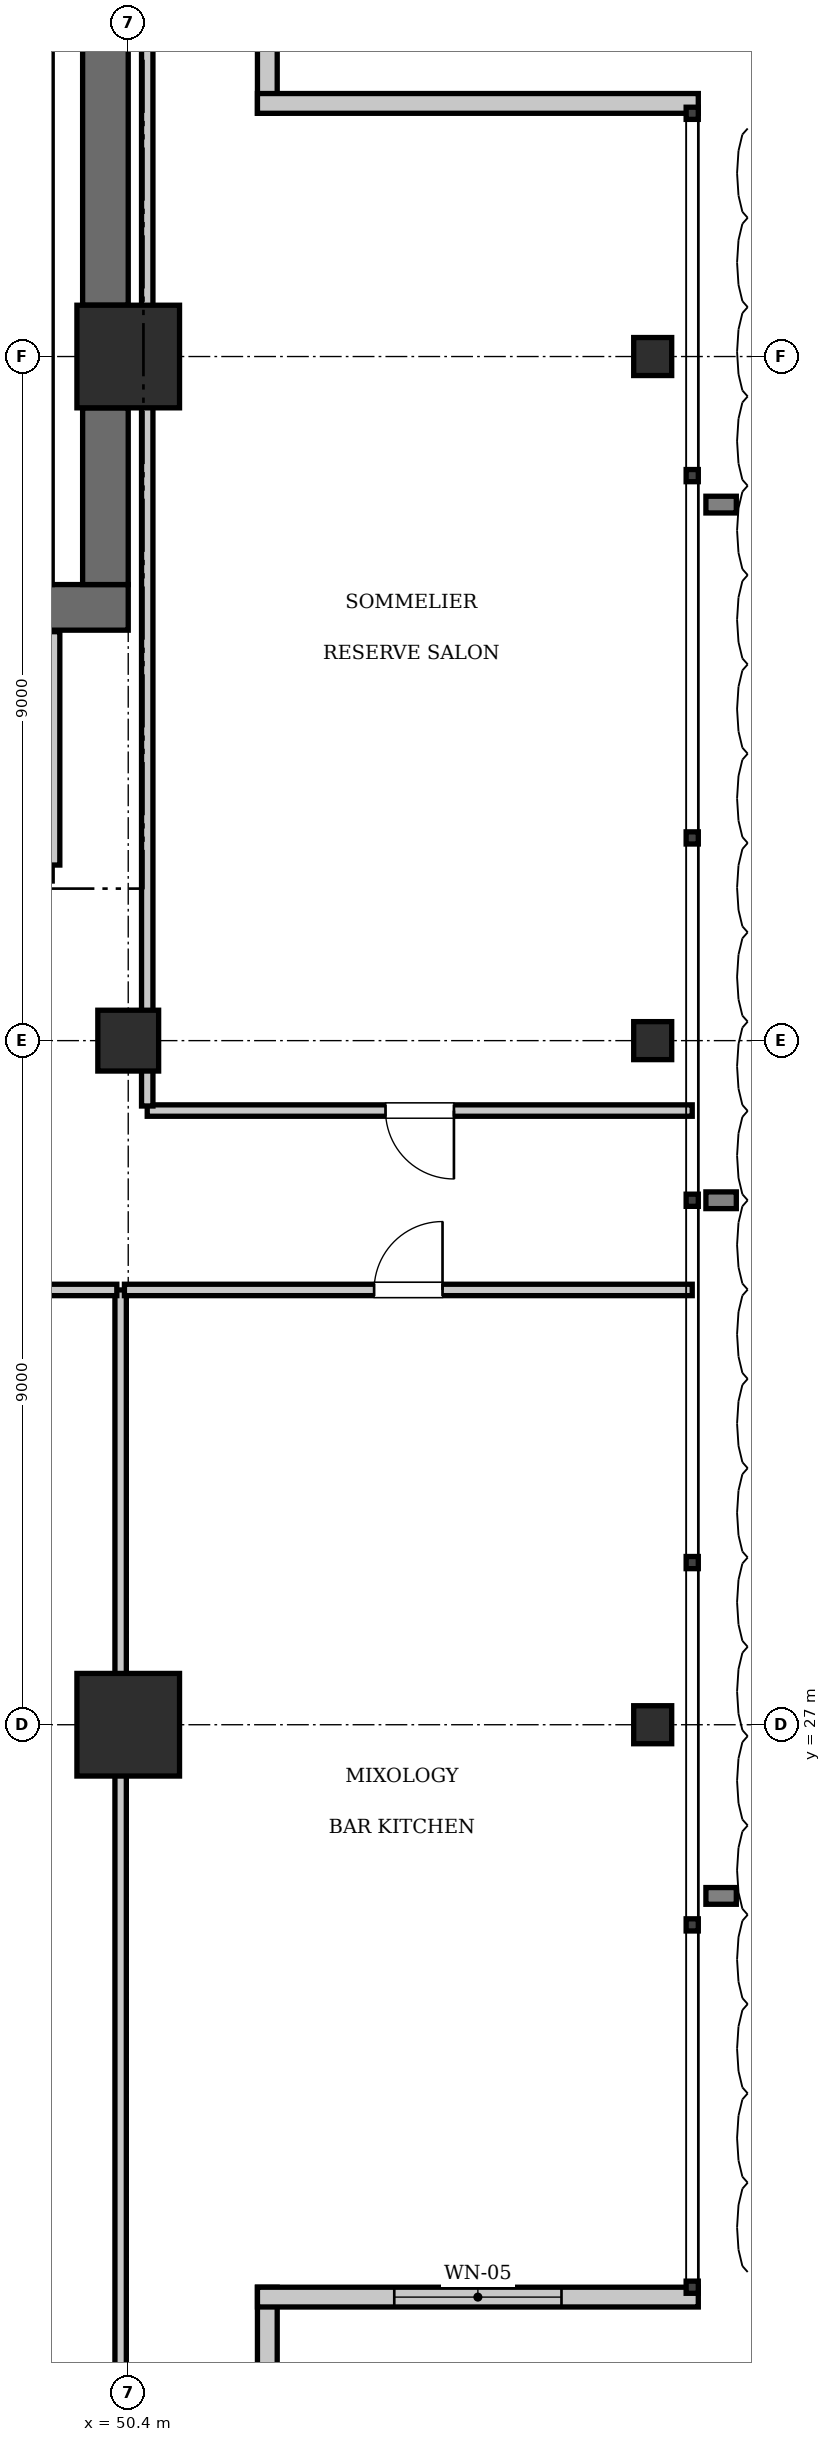
"""IFC4 building model, lengths in metres.
Left out: names, types, materials, properties, quantities, classifications, styles, units other than length and angle.
Written with IfcOpenShell. Run it as: python <this file> out.ifc"""

import sys

from ifc_helpers import new_model, si_unit, direction, frame, frame_2d, origin, origin_2d, place, context, subcontext, project, spatial, rectangle, i_section, extrude, element, fill, save


model = new_model("IFC4")
c1 = context("Model", 3, precision=1e-05, world=origin(), true_north=direction((0.0, 1.0)))
c2 = subcontext(c1, "Body", "Model", "MODEL_VIEW")
j1 = project(units=[si_unit("LENGTHUNIT", "METRE"), si_unit("PLANEANGLEUNIT", "RADIAN")], contexts=[c1])
p1 = place(None, origin())
s1 = spatial("IfcSite", under=j1, at=p1, CompositionType="ELEMENT")
p2 = place(p1, origin())
s2 = spatial("IfcBuilding", under=s1, at=p2, CompositionType="ELEMENT")
p3 = place(p2, frame((0.0, 0.0, 349.65)))
s3 = spatial("IfcBuildingStorey", under=s2, at=p3, CompositionType="ELEMENT", Elevation=349.65)
for number, where, z_axis, x_axis in (
    (1, (50.4, 27.0, 0.0), (0.0, 0.0, 1.0), (1.0, 0.0, 0.0)),
    (2, (50.4, 45.0, 0.0), (0.0, 0.0, 1.0), (1.0, 0.0, 0.0)),
):
    element("IfcColumn", number, at=place(p3, frame(where, z_axis=z_axis, x_axis=x_axis)), inside=s3, PredefinedType="COLUMN", context=c2, shape_type="SweptSolid", body=[
        extrude(rectangle(XDim=1.35, YDim=1.35, at=origin_2d()), origin(), (0.0, 0.0, 1.0), 4.55),
    ])
p4 = place(p3, frame((43.6, 41.7, 0.0), z_axis=(0.0, 0.0, 1.0), x_axis=(1.0, 0.0, 0.0)))
e3 = element("IfcWall", 3, at=p4, inside=s3, PredefinedType="SHEAR", context=c2, shape_type="SweptSolid", body=[
    extrude(rectangle(XDim=6.8, YDim=0.6, at=frame_2d((3.4, 0.0))), origin(), (0.0, 0.0, 1.0), 4.55),
])
p5 = place(p4, frame((3.9, 0.0, 0.0)))
e4 = element("IfcOpeningElement", 4, at=p5, cuts=e3, PredefinedType="OPENING", context=c2, shape_type="SweptSolid", body=[
    extrude(rectangle(XDim=1.15, YDim=2.15, at=frame_2d((0.575, 1.075))), frame((0.0, 0.31, 0.0), z_axis=(0.0, -1.0, 0.0), x_axis=(1.0, 0.0, 0.0)), (0.0, 0.0, 1.0), 0.62),
])
p6 = place(p4, frame((0.55, 0.0, 0.0)))
e5 = element("IfcOpeningElement", 5, at=p6, cuts=e3, PredefinedType="OPENING", context=c2, shape_type="SweptSolid", body=[
    extrude(rectangle(XDim=1.1, YDim=2.2, at=frame_2d((0.55, 1.1))), frame((0.0, 0.31, 0.0), z_axis=(0.0, -1.0, 0.0), x_axis=(1.0, 0.0, 0.0)), (0.0, 0.0, 1.0), 0.62),
])
p7 = place(p3, frame((50.1, 42.0, 0.0), z_axis=(0.0, 0.0, 1.0), x_axis=(0.0, 1.0, 0.0)))
e6 = element("IfcWall", 6, at=p7, inside=s3, PredefinedType="SHEAR", context=c2, shape_type="SweptSolid", body=[
    extrude(rectangle(XDim=2.325, YDim=0.6, at=frame_2d((1.163, 0.0))), origin(), (0.0, 0.0, 1.0), 4.55),
])
p8 = place(p3, frame((50.1, 45.675, 0.0), z_axis=(0.0, 0.0, 1.0), x_axis=(0.0, 1.0, 0.0)))
e7 = element("IfcWall", 7, at=p8, inside=s3, PredefinedType="SHEAR", context=c2, shape_type="SweptSolid", body=[
    extrude(rectangle(XDim=7.725, YDim=0.6, at=frame_2d((3.862, 0.0))), origin(), (0.0, 0.0, 1.0), 4.55),
])
p9 = place(p3, frame((50.4, 36.0, 0.0), z_axis=(0.0, 0.0, 1.0), x_axis=(1.0, 0.0, 0.0)))
e8 = element("IfcColumn", 8, at=p9, inside=s3, PredefinedType="COLUMN", context=c2, shape_type="SweptSolid", body=[
    extrude(rectangle(XDim=0.8, YDim=0.8, at=origin_2d()), origin(), (0.0, 0.0, 1.0), 4.55),
])
for number, where, z_axis, x_axis in (
    (9, (57.3, 27.0, 0.0), (0.0, 0.0, 1.0), (1.0, 0.0, 0.0)),
    (10, (57.3, 36.0, 0.0), (0.0, 0.0, 1.0), (1.0, 0.0, 0.0)),
    (11, (57.3, 45.0, 0.0), (0.0, 0.0, 1.0), (1.0, 0.0, 0.0)),
):
    element("IfcColumn", number, at=place(p3, frame(where, z_axis=z_axis, x_axis=x_axis)), inside=s3, PredefinedType="COLUMN", context=c2, shape_type="SweptSolid", body=[
        extrude(i_section(OverallWidth=0.5, OverallDepth=0.5, WebThickness=0.022, FlangeThickness=0.032, at=origin_2d()), origin(), (0.0, 0.0, 1.0), 4.55),
    ])
p10 = place(p3, frame((49.3, 42.0, 0.0), z_axis=(0.0, 0.0, 1.0), x_axis=(0.0, 1.0, 0.0)))
e12 = element("IfcWall", 12, at=p10, inside=s3, PredefinedType="SOLIDWALL", context=c2, shape_type="SweptSolid", body=[
    extrude(rectangle(XDim=9.12, YDim=0.2, at=frame_2d((4.56, 0.0))), origin(), (0.0, 0.0, 1.0), 4.29),
])
p11 = place(p3, frame((52.23, 19.6, 0.0), z_axis=(0.0, 0.0, 1.0), x_axis=(0.0, -1.0, 0.0)))
e13 = element("IfcWall", 13, at=p11, inside=s3, PredefinedType="SOLIDWALL", context=c2, shape_type="SweptSolid", body=[
    extrude(rectangle(XDim=5.8, YDim=0.26, at=frame_2d((2.9, 0.0))), origin(), (0.0, 0.0, 1.0), 4.29),
])
p12 = place(p3, frame((57.9, 19.47, 0.0), z_axis=(0.0, 0.0, 1.0), x_axis=(-1.0, 0.0, 0.0)))
e14 = element("IfcWall", 14, at=p12, inside=s3, PredefinedType="SOLIDWALL", context=c2, shape_type="SweptSolid", body=[
    extrude(rectangle(XDim=5.8, YDim=0.26, at=frame_2d((2.9, 0.0))), origin(), (0.0, 0.0, 1.0), 4.29),
])
p13 = place(p12, frame((1.8, 0.0, 0.9)))
e15 = element("IfcOpeningElement", 15, at=p13, cuts=e14, PredefinedType="OPENING", context=c2, shape_type="SweptSolid", body=[
    extrude(rectangle(XDim=2.2, YDim=2.8, at=frame_2d((1.1, 1.4))), frame((0.0, 0.14, 0.0), z_axis=(0.0, -1.0, 0.0), x_axis=(1.0, 0.0, 0.0)), (0.0, 0.0, 1.0), 0.28),
])
p14 = place(p3, frame((52.23, 54.0, 0.0), z_axis=(0.0, 0.0, 1.0), x_axis=(0.0, -1.0, 0.0)))
e16 = element("IfcWall", 16, at=p14, inside=s3, PredefinedType="SOLIDWALL", context=c2, shape_type="SweptSolid", body=[
    extrude(rectangle(XDim=5.8, YDim=0.26, at=frame_2d((2.9, 0.0))), origin(), (0.0, 0.0, 1.0), 4.29),
])
p15 = place(p3, frame((52.1, 48.33, 0.0), z_axis=(0.0, 0.0, 1.0), x_axis=(1.0, 0.0, 0.0)))
e17 = element("IfcWall", 17, at=p15, inside=s3, PredefinedType="SOLIDWALL", context=c2, shape_type="SweptSolid", body=[
    extrude(rectangle(XDim=5.8, YDim=0.26, at=frame_2d((2.9, 0.0))), origin(), (0.0, 0.0, 1.0), 4.29),
])
p16 = place(p3, frame((49.4, 38.31, 0.0), z_axis=(0.0, 0.0, 1.0), x_axis=(0.0, 1.0, 0.0)))
e18 = element("IfcWall", 18, at=p16, inside=s3, PredefinedType="PARTITIONING", context=c2, shape_type="SweptSolid", body=[
    extrude(rectangle(XDim=3.07, YDim=0.2, at=frame_2d((1.535, 0.0))), origin(), (0.0, 0.0, 1.0), 4.29),
])
p17 = place(p3, frame((50.3, 13.88, 0.0), z_axis=(0.0, 0.0, 1.0), x_axis=(0.0, 1.0, 0.0)))
e19 = element("IfcWall", 19, at=p17, inside=s3, PredefinedType="PARTITIONING", context=c2, shape_type="SweptSolid", body=[
    extrude(rectangle(XDim=18.84, YDim=0.15, at=frame_2d((9.42, 0.0))), origin(), (0.0, 0.0, 1.0), 3.821),
])
p18 = place(p3, frame((37.88, 32.72, 0.0), z_axis=(0.0, 0.0, 1.0), x_axis=(1.0, 0.0, 0.0)))
e20 = element("IfcWall", 20, at=p18, inside=s3, PredefinedType="PARTITIONING", context=c2, shape_type="SweptSolid", body=[
    extrude(rectangle(XDim=12.37, YDim=0.15, at=frame_2d((6.185, 0.0))), origin(), (0.0, 0.0, 1.0), 4.29),
])
p19 = place(p18, frame((5.385, 0.0, 0.0)))
e21 = element("IfcOpeningElement", 21, at=p19, cuts=e20, PredefinedType="OPENING", context=c2, shape_type="SweptSolid", body=[
    extrude(rectangle(XDim=1.6, YDim=2.3, at=frame_2d((0.8, 1.15))), frame((0.0, 0.085, 0.0), z_axis=(0.0, -1.0, 0.0), x_axis=(1.0, 0.0, 0.0)), (0.0, 0.0, 1.0), 0.17),
])
p20 = place(p3, frame((50.35, 32.72, 0.0), z_axis=(0.0, 0.0, 1.0), x_axis=(1.0, 0.0, 0.0)))
e22 = element("IfcWall", 22, at=p20, inside=s3, PredefinedType="PARTITIONING", context=c2, shape_type="SweptSolid", body=[
    extrude(rectangle(XDim=7.47, YDim=0.15, at=frame_2d((3.735, 0.0))), origin(), (0.0, 0.0, 1.0), 4.29),
])
p21 = place(p20, frame((3.285, 0.0, 0.0)))
e23 = element("IfcOpeningElement", 23, at=p21, cuts=e22, PredefinedType="OPENING", context=c2, shape_type="SweptSolid", body=[
    extrude(rectangle(XDim=0.9, YDim=2.1, at=frame_2d((0.45, 1.05))), frame((0.0, 0.085, 0.0), z_axis=(0.0, -1.0, 0.0), x_axis=(1.0, 0.0, 0.0)), (0.0, 0.0, 1.0), 0.17),
])
p22 = place(p3, frame((50.65, 35.08, 0.0), z_axis=(0.0, 0.0, 1.0), x_axis=(1.0, 0.0, 0.0)))
e24 = element("IfcWall", 24, at=p22, inside=s3, PredefinedType="PARTITIONING", context=c2, shape_type="SweptSolid", body=[
    extrude(rectangle(XDim=7.17, YDim=0.15, at=frame_2d((3.585, 0.0))), origin(), (0.0, 0.0, 1.0), 4.29),
])
p23 = place(p22, frame((3.135, 0.0, 0.0)))
e25 = element("IfcOpeningElement", 25, at=p23, cuts=e24, PredefinedType="OPENING", context=c2, shape_type="SweptSolid", body=[
    extrude(rectangle(XDim=0.9, YDim=2.1, at=frame_2d((0.45, 1.05))), frame((0.0, 0.085, 0.0), z_axis=(0.0, -1.0, 0.0), x_axis=(1.0, 0.0, 0.0)), (0.0, 0.0, 1.0), 0.17),
])
p24 = place(p3, frame((50.65, 35.14, 0.0), z_axis=(0.0, 0.0, 1.0), x_axis=(0.0, 1.0, 0.0)))
e26 = element("IfcWall", 26, at=p24, inside=s3, PredefinedType="PARTITIONING", context=c2, shape_type="SweptSolid", body=[
    extrude(rectangle(XDim=18.78, YDim=0.15, at=frame_2d((9.39, 0.0))), origin(), (0.0, 0.0, 1.0), 4.29),
])
p25 = place(p13, origin())
e27 = element("IfcWindow", 27, at=p25, inside=s3, PartitioningType="SINGLE_PANEL", PredefinedType="WINDOW", context=c2, shape_type="SweptSolid", body=[
    extrude(rectangle(XDim=2.2, YDim=2.8, at=frame_2d((1.1, 1.4))), frame((0.0, 0.03, 0.0), z_axis=(0.0, -1.0, 0.0), x_axis=(1.0, 0.0, 0.0)), (0.0, 0.0, 1.0), 0.06),
])
fill(e15, e27)
p26 = place(p21, origin())
e28 = element("IfcDoor", 28, at=p26, inside=s3, OperationType="SINGLE_SWING_RIGHT", PredefinedType="DOOR", context=c2, shape_type="SweptSolid", body=[
    extrude(rectangle(XDim=0.9, YDim=2.1, at=frame_2d((0.45, 1.05))), frame((0.0, 0.025, 0.0), z_axis=(0.0, -1.0, 0.0), x_axis=(1.0, 0.0, 0.0)), (0.0, 0.0, 1.0), 0.05),
])
fill(e23, e28)
p27 = place(p23, frame((0.9, 0.0, 0.0), z_axis=(0.0, 0.0, 1.0), x_axis=(-1.0, 0.0, 0.0)))
e29 = element("IfcDoor", 29, at=p27, inside=s3, OperationType="SINGLE_SWING_LEFT", PredefinedType="DOOR", context=c2, shape_type="SweptSolid", body=[
    extrude(rectangle(XDim=0.9, YDim=2.1, at=frame_2d((0.45, 1.05))), frame((0.0, 0.025, 0.0), z_axis=(0.0, -1.0, 0.0), x_axis=(1.0, 0.0, 0.0)), (0.0, 0.0, 1.0), 0.05),
])
fill(e25, e29)
save(model, sys.argv[1])
